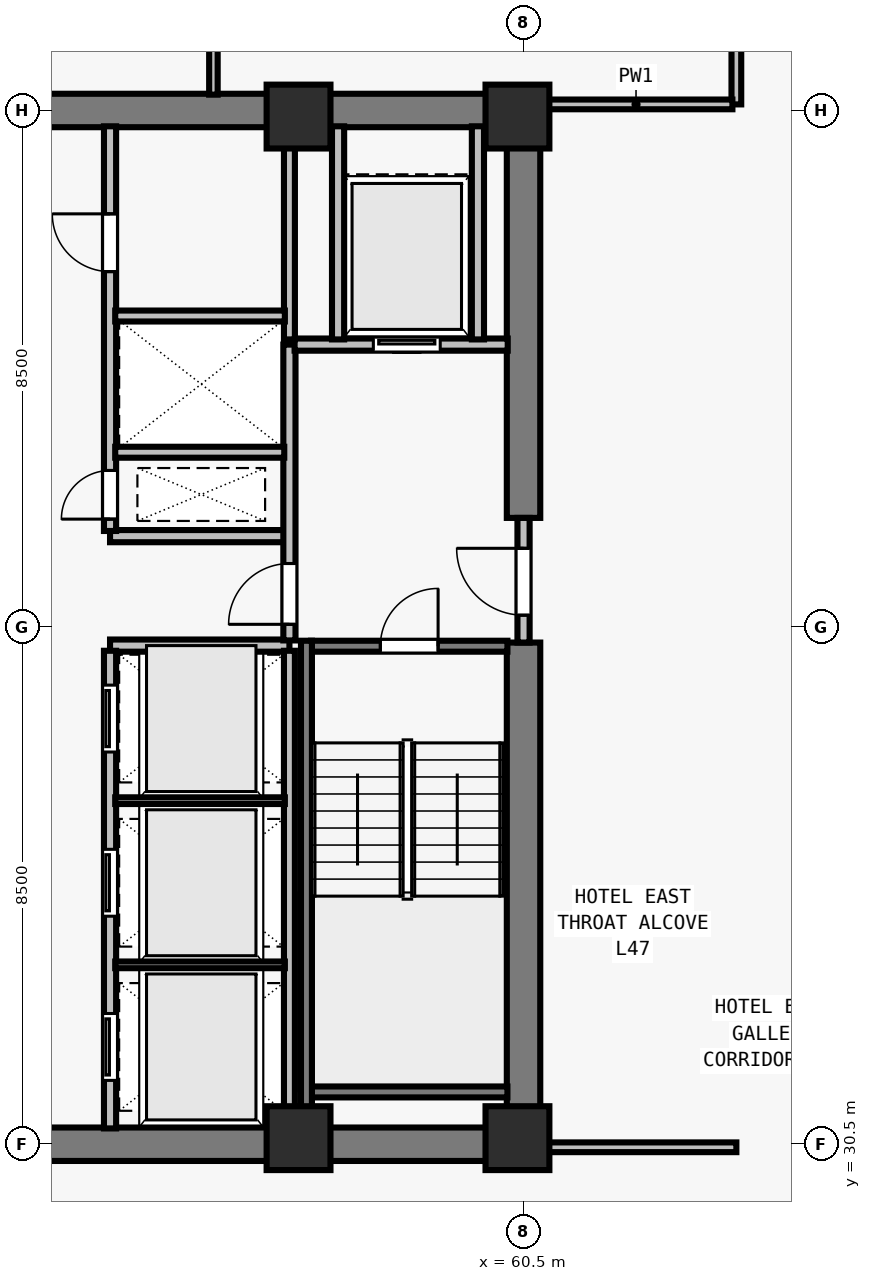
"""IFC4 building model, lengths in metres.
Left out: names, types, materials, properties, quantities, classifications, styles, units other than length and angle.
Written with IfcOpenShell. Run it as: python <this file> out.ifc"""

import sys

from ifc_helpers import new_model, si_unit, direction, frame, frame_2d, origin, origin_2d, place, context, subcontext, project, spatial, rectangle, extrude, element, fill, save


model = new_model("IFC4")
c1 = context("Model", 3, precision=1e-05, world=origin(), true_north=direction((0.0, 1.0)))
c2 = subcontext(c1, "Body", "Model", "MODEL_VIEW")
j1 = project(units=[si_unit("LENGTHUNIT", "METRE"), si_unit("PLANEANGLEUNIT", "RADIAN")], contexts=[c1])
p1 = place(None, origin())
s1 = spatial("IfcSite", under=j1, at=p1, CompositionType="ELEMENT")
p2 = place(p1, origin())
s2 = spatial("IfcBuilding", under=s1, at=p2, CompositionType="ELEMENT")
p3 = place(p2, frame((0.0, 0.0, 172.5)))
s3 = spatial("IfcBuildingStorey", under=s2, at=p3, CompositionType="ELEMENT", Elevation=172.5)
for number, where, z_axis, x_axis in (
    (1, (56.8, 30.6, 0.0), (0.0, 0.0, 1.0), (1.0, 0.0, 0.0)),
    (2, (60.4, 30.6, 0.0), (0.0, 0.0, 1.0), (1.0, 0.0, 0.0)),
    (3, (56.8, 47.4, 0.0), (0.0, 0.0, 1.0), (1.0, 0.0, 0.0)),
    (4, (60.4, 47.4, 0.0), (0.0, 0.0, 1.0), (1.0, 0.0, 0.0)),
):
    element("IfcColumn", number, at=place(p3, frame(where, z_axis=z_axis, x_axis=x_axis)), inside=s3, PredefinedType="COLUMN", context=c2, shape_type="SweptSolid", body=[
        extrude(rectangle(XDim=1.05, YDim=1.05, at=origin_2d()), origin(), (0.0, 0.0, 1.0), 3.5),
    ])
for number, where, z_axis, x_axis in (
    (5, (43.225, 30.5, 0.0), (0.0, 0.0, 1.0), (1.0, 0.0, 0.0)),
    (6, (43.225, 47.5, 0.0), (0.0, 0.0, 1.0), (1.0, 0.0, 0.0)),
):
    element("IfcWall", number, at=place(p3, frame(where, z_axis=z_axis, x_axis=x_axis)), inside=s3, PredefinedType="SHEAR", context=c2, shape_type="SweptSolid", body=[
        extrude(rectangle(XDim=17.55, YDim=0.55, at=frame_2d((8.775, 0.0))), origin(), (0.0, 0.0, 1.0), 3.28),
    ])
p4 = place(p3, frame((60.5, 30.765, 0.0), z_axis=(0.0, 0.0, 1.0), x_axis=(0.0, 1.0, 0.0)))
e7 = element("IfcWall", 7, at=p4, inside=s3, PredefinedType="SHEAR", context=c2, shape_type="SweptSolid", body=[
    extrude(rectangle(XDim=7.985, YDim=0.55, at=frame_2d((3.993, 0.0))), origin(), (0.0, 0.0, 1.0), 3.28),
])
p5 = place(p3, frame((60.5, 40.8, 0.0), z_axis=(0.0, 0.0, 1.0), x_axis=(0.0, 1.0, 0.0)))
e8 = element("IfcWall", 8, at=p5, inside=s3, PredefinedType="SHEAR", context=c2, shape_type="SweptSolid", body=[
    extrude(rectangle(XDim=6.435, YDim=0.55, at=frame_2d((3.218, 0.0))), origin(), (0.0, 0.0, 1.0), 3.28),
])
for number, where, z_axis, x_axis in (
    (9, (53.7, 38.7, 0.0), (0.0, 0.0, 1.0), (1.0, 0.0, 0.0)),
    (10, (53.7, 40.5, 0.0), (0.0, 0.0, 1.0), (1.0, 0.0, 0.0)),
):
    element("IfcWall", number, at=place(p3, frame(where, z_axis=z_axis, x_axis=x_axis)), inside=s3, PredefinedType="SOLIDWALL", context=c2, shape_type="SweptSolid", body=[
        extrude(rectangle(XDim=2.95, YDim=0.2, at=frame_2d((1.475, 0.0))), origin(), (0.0, 0.0, 1.0), 3.28),
    ])
p6 = place(p3, frame((53.7, 30.76, 0.0), z_axis=(0.0, 0.0, 1.0), x_axis=(0.0, 1.0, 0.0)))
e11 = element("IfcWall", 11, at=p6, inside=s3, PredefinedType="SOLIDWALL", context=c2, shape_type="SweptSolid", body=[
    extrude(rectangle(XDim=7.855, YDim=0.2, at=frame_2d((3.927, 0.0))), origin(), (0.0, 0.0, 1.0), 3.28),
])
p7 = place(p6, frame((0.79, 0.0, 0.0)))
e12 = element("IfcOpeningElement", 12, at=p7, cuts=e11, PredefinedType="OPENING", context=c2, shape_type="SweptSolid", body=[
    extrude(rectangle(XDim=1.1, YDim=2.2, at=frame_2d((0.55, 1.1))), frame((0.0, 0.11, 0.0), z_axis=(0.0, -1.0, 0.0), x_axis=(1.0, 0.0, 0.0)), (0.0, 0.0, 1.0), 0.22),
])
p8 = place(p6, frame((3.49, 0.0, 0.0)))
e13 = element("IfcOpeningElement", 13, at=p8, cuts=e11, PredefinedType="OPENING", context=c2, shape_type="SweptSolid", body=[
    extrude(rectangle(XDim=1.1, YDim=2.2, at=frame_2d((0.55, 1.1))), frame((0.0, 0.11, 0.0), z_axis=(0.0, -1.0, 0.0), x_axis=(1.0, 0.0, 0.0)), (0.0, 0.0, 1.0), 0.22),
])
p9 = place(p6, frame((6.19, 0.0, 0.0)))
e14 = element("IfcOpeningElement", 14, at=p9, cuts=e11, PredefinedType="OPENING", context=c2, shape_type="SweptSolid", body=[
    extrude(rectangle(XDim=1.1, YDim=2.2, at=frame_2d((0.55, 1.1))), frame((0.0, 0.11, 0.0), z_axis=(0.0, -1.0, 0.0), x_axis=(1.0, 0.0, 0.0)), (0.0, 0.0, 1.0), 0.22),
])
p10 = place(p3, frame((53.7, 40.585, 0.0), z_axis=(0.0, 0.0, 1.0), x_axis=(0.0, 1.0, 0.0)))
e15 = element("IfcWall", 15, at=p10, inside=s3, PredefinedType="SOLIDWALL", context=c2, shape_type="SweptSolid", body=[
    extrude(rectangle(XDim=6.655, YDim=0.2, at=frame_2d((3.328, 0.0))), origin(), (0.0, 0.0, 1.0), 3.28),
])
p11 = place(p10, frame((0.195, 0.0, 0.0)))
e16 = element("IfcOpeningElement", 16, at=p11, cuts=e15, PredefinedType="OPENING", context=c2, shape_type="SweptSolid", body=[
    extrude(rectangle(XDim=0.8, YDim=2.08, at=frame_2d((0.4, 1.04))), frame((0.0, 0.11, 0.0), z_axis=(0.0, -1.0, 0.0), x_axis=(1.0, 0.0, 0.0)), (0.0, 0.0, 1.0), 0.22),
])
p12 = place(p10, frame((4.265, 0.0, 0.0)))
e17 = element("IfcOpeningElement", 17, at=p12, cuts=e15, PredefinedType="OPENING", context=c2, shape_type="SweptSolid", body=[
    extrude(rectangle(XDim=0.95, YDim=2.12, at=frame_2d((0.475, 1.06))), frame((0.0, 0.11, 0.0), z_axis=(0.0, -1.0, 0.0), x_axis=(1.0, 0.0, 0.0)), (0.0, 0.0, 1.0), 0.22),
])
p13 = place(p3, frame((60.5, 38.75, 0.0), z_axis=(0.0, 0.0, 1.0), x_axis=(0.0, 1.0, 0.0)))
e18 = element("IfcWall", 18, at=p13, inside=s3, PredefinedType="SOLIDWALL", context=c2, shape_type="SweptSolid", body=[
    extrude(rectangle(XDim=2.05, YDim=0.2, at=frame_2d((1.025, 0.0))), origin(), (0.0, 0.0, 1.0), 3.28),
])
p14 = place(p13, frame((0.45, 0.0, 0.0)))
e19 = element("IfcOpeningElement", 19, at=p14, cuts=e18, PredefinedType="OPENING", context=c2, shape_type="SweptSolid", body=[
    extrude(rectangle(XDim=1.1, YDim=2.15, at=frame_2d((0.55, 1.075))), frame((0.0, 0.11, 0.0), z_axis=(0.0, -1.0, 0.0), x_axis=(1.0, 0.0, 0.0)), (0.0, 0.0, 1.0), 0.22),
])
p15 = place(p3, frame((56.65, 38.785, 0.0), z_axis=(0.0, 0.0, 1.0), x_axis=(0.0, 1.0, 0.0)))
e20 = element("IfcWall", 20, at=p15, inside=s3, PredefinedType="SOLIDWALL", context=c2, shape_type="SweptSolid", body=[
    extrude(rectangle(XDim=4.865, YDim=0.2, at=frame_2d((2.433, 0.0))), origin(), (0.0, 0.0, 1.0), 3.28),
])
p16 = place(p15, frame((0.265, 0.0, 0.0)))
e21 = element("IfcOpeningElement", 21, at=p16, cuts=e20, PredefinedType="OPENING", context=c2, shape_type="SweptSolid", body=[
    extrude(rectangle(XDim=1.0, YDim=2.15, at=frame_2d((0.5, 1.075))), frame((0.0, 0.11, 0.0), z_axis=(0.0, -1.0, 0.0), x_axis=(1.0, 0.0, 0.0)), (0.0, 0.0, 1.0), 0.22),
])
p17 = place(p3, frame((56.735, 43.65, 0.0), z_axis=(0.0, 0.0, 1.0), x_axis=(1.0, 0.0, 0.0)))
e22 = element("IfcWall", 22, at=p17, inside=s3, PredefinedType="SOLIDWALL", context=c2, shape_type="SweptSolid", body=[
    extrude(rectangle(XDim=3.505, YDim=0.2, at=frame_2d((1.752, 0.0))), origin(), (0.0, 0.0, 1.0), 3.28),
])
p18 = place(p17, frame((1.295, 0.0, 0.0)))
e23 = element("IfcOpeningElement", 23, at=p18, cuts=e22, PredefinedType="OPENING", context=c2, shape_type="SweptSolid", body=[
    extrude(rectangle(XDim=1.1, YDim=2.2, at=frame_2d((0.55, 1.1))), frame((0.0, 0.11, 0.0), z_axis=(0.0, -1.0, 0.0), x_axis=(1.0, 0.0, 0.0)), (0.0, 0.0, 1.0), 0.22),
])
for number, where, z_axis, x_axis in (
    (24, (57.45, 43.735, 0.0), (0.0, 0.0, 1.0), (0.0, 1.0, 0.0)),
    (25, (59.75, 43.735, 0.0), (0.0, 0.0, 1.0), (0.0, 1.0, 0.0)),
):
    element("IfcWall", number, at=place(p3, frame(where, z_axis=z_axis, x_axis=x_axis)), inside=s3, PredefinedType="SOLIDWALL", context=c2, shape_type="SweptSolid", body=[
        extrude(rectangle(XDim=3.505, YDim=0.2, at=frame_2d((1.752, 0.0))), origin(), (0.0, 0.0, 1.0), 3.28),
    ])
p19 = place(p3, frame((56.65, 30.76, 0.0), z_axis=(0.0, 0.0, 1.0), x_axis=(0.0, 1.0, 0.0)))
e26 = element("IfcWall", 26, at=p19, inside=s3, PredefinedType="SOLIDWALL", context=c2, shape_type="SweptSolid", body=[
    extrude(rectangle(XDim=7.855, YDim=0.18, at=frame_2d((3.927, 0.0))), origin(), (0.0, 0.0, 1.0), 3.28),
])
for number, where, z_axis, x_axis in (
    (27, (53.785, 33.45, 0.0), (0.0, 0.0, 1.0), (1.0, 0.0, 0.0)),
    (28, (53.785, 36.15, 0.0), (0.0, 0.0, 1.0), (1.0, 0.0, 0.0)),
):
    element("IfcWall", number, at=place(p3, frame(where, z_axis=z_axis, x_axis=x_axis)), inside=s3, PredefinedType="PARTITIONING", context=c2, shape_type="SweptSolid", body=[
        extrude(rectangle(XDim=2.79, YDim=0.11, at=frame_2d((1.395, 0.0))), origin(), (0.0, 0.0, 1.0), 3.28),
    ])
p20 = place(p3, frame((56.65, 43.735, 0.0), z_axis=(0.0, 0.0, 1.0), x_axis=(0.0, 1.0, 0.0)))
e29 = element("IfcWall", 29, at=p20, inside=s3, PredefinedType="SOLIDWALL", context=c2, shape_type="SweptSolid", body=[
    extrude(rectangle(XDim=3.505, YDim=0.18, at=frame_2d((1.752, 0.0))), origin(), (0.0, 0.0, 1.0), 3.28),
])
p21 = place(p3, frame((53.785, 41.88, 0.0), z_axis=(0.0, 0.0, 1.0), x_axis=(1.0, 0.0, 0.0)))
e30 = element("IfcWall", 30, at=p21, inside=s3, PredefinedType="SOLIDWALL", context=c2, shape_type="SweptSolid", body=[
    extrude(rectangle(XDim=2.78, YDim=0.18, at=frame_2d((1.39, 0.0))), origin(), (0.0, 0.0, 1.0), 3.28),
])
p22 = place(p3, frame((53.785, 44.12, 0.0), z_axis=(0.0, 0.0, 1.0), x_axis=(1.0, 0.0, 0.0)))
e31 = element("IfcWall", 31, at=p22, inside=s3, PredefinedType="SOLIDWALL", context=c2, shape_type="SweptSolid", body=[
    extrude(rectangle(XDim=2.79, YDim=0.18, at=frame_2d((1.395, 0.0))), origin(), (0.0, 0.0, 1.0), 3.28),
])
p23 = place(p3, frame((64.0, 47.6, 0.0), z_axis=(0.0, 0.0, 1.0), x_axis=(0.0, 1.0, 0.0)))
e32 = element("IfcWall", 32, at=p23, inside=s3, PredefinedType="PARTITIONING", context=c2, shape_type="SweptSolid", body=[
    extrude(rectangle(XDim=15.075, YDim=0.16, at=frame_2d((7.538, 0.0))), origin(), (0.0, 0.0, 1.0), 2.555),
])
p24 = place(p23, frame((3.5, 0.0, 0.0)))
e33 = element("IfcOpeningElement", 33, at=p24, cuts=e32, PredefinedType="OPENING", context=c2, shape_type="SweptSolid", body=[
    extrude(rectangle(XDim=0.96, YDim=2.12, at=frame_2d((0.48, 1.06))), frame((0.0, 0.09, 0.0), z_axis=(0.0, -1.0, 0.0), x_axis=(1.0, 0.0, 0.0)), (0.0, 0.0, 1.0), 0.18),
])
p25 = place(p3, frame((60.765, 30.45, 0.0), z_axis=(0.0, 0.0, 1.0), x_axis=(1.0, 0.0, 0.0)))
e34 = element("IfcWall", 34, at=p25, inside=s3, PredefinedType="PARTITIONING", context=c2, shape_type="SweptSolid", body=[
    extrude(rectangle(XDim=3.235, YDim=0.16, at=frame_2d((1.618, 0.0))), origin(), (0.0, 0.0, 1.0), 3.28),
])
p26 = place(p3, frame((60.765, 47.6, 0.0), z_axis=(0.0, 0.0, 1.0), x_axis=(1.0, 0.0, 0.0)))
e35 = element("IfcWall", 35, at=p26, inside=s3, PredefinedType="PARTITIONING", context=c2, shape_type="SweptSolid", body=[
    extrude(rectangle(XDim=3.17, YDim=0.16, at=frame_2d((1.585, 0.0))), origin(), (0.0, 0.0, 1.0), 3.28),
])
p27 = place(p3, frame((55.4, 47.76, 0.0), z_axis=(0.0, 0.0, 1.0), x_axis=(0.0, 1.0, 0.0)))
e36 = element("IfcWall", 36, at=p27, inside=s3, PredefinedType="PARTITIONING", context=c2, shape_type="SweptSolid", body=[
    extrude(rectangle(XDim=14.915, YDim=0.14, at=frame_2d((7.458, 0.0))), origin(), (0.0, 0.0, 1.0), 2.896),
])
p28 = place(p3, frame((57.005, 38.69, 0.0), z_axis=(0.0, 0.0, 1.0), x_axis=(1.0, 0.0, 0.0)))
e37 = element("IfcWall", 37, at=p28, inside=s3, PredefinedType="SOLIDWALL", context=c2, shape_type="SweptSolid", body=[
    extrude(rectangle(XDim=3.23, YDim=0.18, at=frame_2d((1.615, 0.0))), origin(), (0.0, 0.0, 1.0), 3.28),
])
p29 = place(p28, frame((1.14, 0.0, 0.0)))
e38 = element("IfcOpeningElement", 38, at=p29, cuts=e37, PredefinedType="OPENING", context=c2, shape_type="SweptSolid", body=[
    extrude(rectangle(XDim=0.95, YDim=2.15, at=frame_2d((0.475, 1.075))), frame((0.0, 0.1, 0.0), z_axis=(0.0, -1.0, 0.0), x_axis=(1.0, 0.0, 0.0)), (0.0, 0.0, 1.0), 0.2),
])
p30 = place(p3, frame((57.005, 31.36, 0.0), z_axis=(0.0, 0.0, 1.0), x_axis=(1.0, 0.0, 0.0)))
e39 = element("IfcWall", 39, at=p30, inside=s3, PredefinedType="SOLIDWALL", context=c2, shape_type="SweptSolid", body=[
    extrude(rectangle(XDim=3.23, YDim=0.18, at=frame_2d((1.615, 0.0))), origin(), (0.0, 0.0, 1.0), 3.28),
])
p31 = place(p3, frame((56.93, 38.78, 0.0), z_axis=(0.0, 0.0, 1.0), x_axis=(0.0, -1.0, 0.0)))
e40 = element("IfcWall", 40, at=p31, inside=s3, PredefinedType="SOLIDWALL", context=c2, shape_type="SweptSolid", body=[
    extrude(rectangle(XDim=8.017, YDim=0.18, at=frame_2d((4.009, 0.0))), origin(), (0.0, 0.0, 1.0), 3.28),
])
p32 = place(p14, origin())
e41 = element("IfcDoor", 41, at=p32, inside=s3, OperationType="SINGLE_SWING_RIGHT", PredefinedType="DOOR", context=c2, shape_type="SweptSolid", body=[
    extrude(rectangle(XDim=1.1, YDim=2.15, at=frame_2d((0.55, 1.075))), frame((0.0, 0.025, 0.0), z_axis=(0.0, -1.0, 0.0), x_axis=(1.0, 0.0, 0.0)), (0.0, 0.0, 1.0), 0.05),
])
fill(e19, e41)
p33 = place(p16, origin())
e42 = element("IfcDoor", 42, at=p33, inside=s3, OperationType="SINGLE_SWING_LEFT", PredefinedType="DOOR", context=c2, shape_type="SweptSolid", body=[
    extrude(rectangle(XDim=1.0, YDim=2.15, at=frame_2d((0.5, 1.075))), frame((0.0, 0.025, 0.0), z_axis=(0.0, -1.0, 0.0), x_axis=(1.0, 0.0, 0.0)), (0.0, 0.0, 1.0), 0.05),
])
fill(e21, e42)
p34 = place(p18, origin())
e43 = element("IfcDoor", 43, at=p34, inside=s3, OperationType="SLIDING_TO_LEFT", PredefinedType="DOOR", context=c2, shape_type="SweptSolid", body=[
    extrude(rectangle(XDim=1.1, YDim=2.2, at=frame_2d((0.55, 1.1))), frame((0.0, 0.025, 0.0), z_axis=(0.0, -1.0, 0.0), x_axis=(1.0, 0.0, 0.0)), (0.0, 0.0, 1.0), 0.05),
])
fill(e23, e43)
p35 = place(p7, origin())
e44 = element("IfcDoor", 44, at=p35, inside=s3, OperationType="SLIDING_TO_LEFT", PredefinedType="DOOR", context=c2, shape_type="SweptSolid", body=[
    extrude(rectangle(XDim=1.1, YDim=2.2, at=frame_2d((0.55, 1.1))), frame((0.0, 0.025, 0.0), z_axis=(0.0, -1.0, 0.0), x_axis=(1.0, 0.0, 0.0)), (0.0, 0.0, 1.0), 0.05),
])
fill(e12, e44)
p36 = place(p8, origin())
e45 = element("IfcDoor", 45, at=p36, inside=s3, OperationType="SLIDING_TO_LEFT", PredefinedType="DOOR", context=c2, shape_type="SweptSolid", body=[
    extrude(rectangle(XDim=1.1, YDim=2.2, at=frame_2d((0.55, 1.1))), frame((0.0, 0.025, 0.0), z_axis=(0.0, -1.0, 0.0), x_axis=(1.0, 0.0, 0.0)), (0.0, 0.0, 1.0), 0.05),
])
fill(e13, e45)
p37 = place(p9, origin())
e46 = element("IfcDoor", 46, at=p37, inside=s3, OperationType="SLIDING_TO_LEFT", PredefinedType="DOOR", context=c2, shape_type="SweptSolid", body=[
    extrude(rectangle(XDim=1.1, YDim=2.2, at=frame_2d((0.55, 1.1))), frame((0.0, 0.025, 0.0), z_axis=(0.0, -1.0, 0.0), x_axis=(1.0, 0.0, 0.0)), (0.0, 0.0, 1.0), 0.05),
])
fill(e14, e46)
p38 = place(p11, origin())
e47 = element("IfcDoor", 47, at=p38, inside=s3, OperationType="SINGLE_SWING_LEFT", PredefinedType="DOOR", context=c2, shape_type="SweptSolid", body=[
    extrude(rectangle(XDim=0.8, YDim=2.08, at=frame_2d((0.4, 1.04))), frame((0.0, 0.025, 0.0), z_axis=(0.0, -1.0, 0.0), x_axis=(1.0, 0.0, 0.0)), (0.0, 0.0, 1.0), 0.05),
])
fill(e16, e47)
p39 = place(p12, origin())
e48 = element("IfcDoor", 48, at=p39, inside=s3, OperationType="SINGLE_SWING_RIGHT", PredefinedType="DOOR", context=c2, shape_type="SweptSolid", body=[
    extrude(rectangle(XDim=0.95, YDim=2.12, at=frame_2d((0.475, 1.06))), frame((0.0, 0.025, 0.0), z_axis=(0.0, -1.0, 0.0), x_axis=(1.0, 0.0, 0.0)), (0.0, 0.0, 1.0), 0.05),
])
fill(e17, e48)
p40 = place(p29, origin())
e49 = element("IfcDoor", 49, at=p40, inside=s3, OperationType="SINGLE_SWING_RIGHT", PredefinedType="DOOR", context=c2, shape_type="SweptSolid", body=[
    extrude(rectangle(XDim=0.95, YDim=2.15, at=frame_2d((0.475, 1.075))), frame((0.0, 0.025, 0.0), z_axis=(0.0, -1.0, 0.0), x_axis=(1.0, 0.0, 0.0)), (0.0, 0.0, 1.0), 0.05),
])
fill(e38, e49)
save(model, sys.argv[1])
